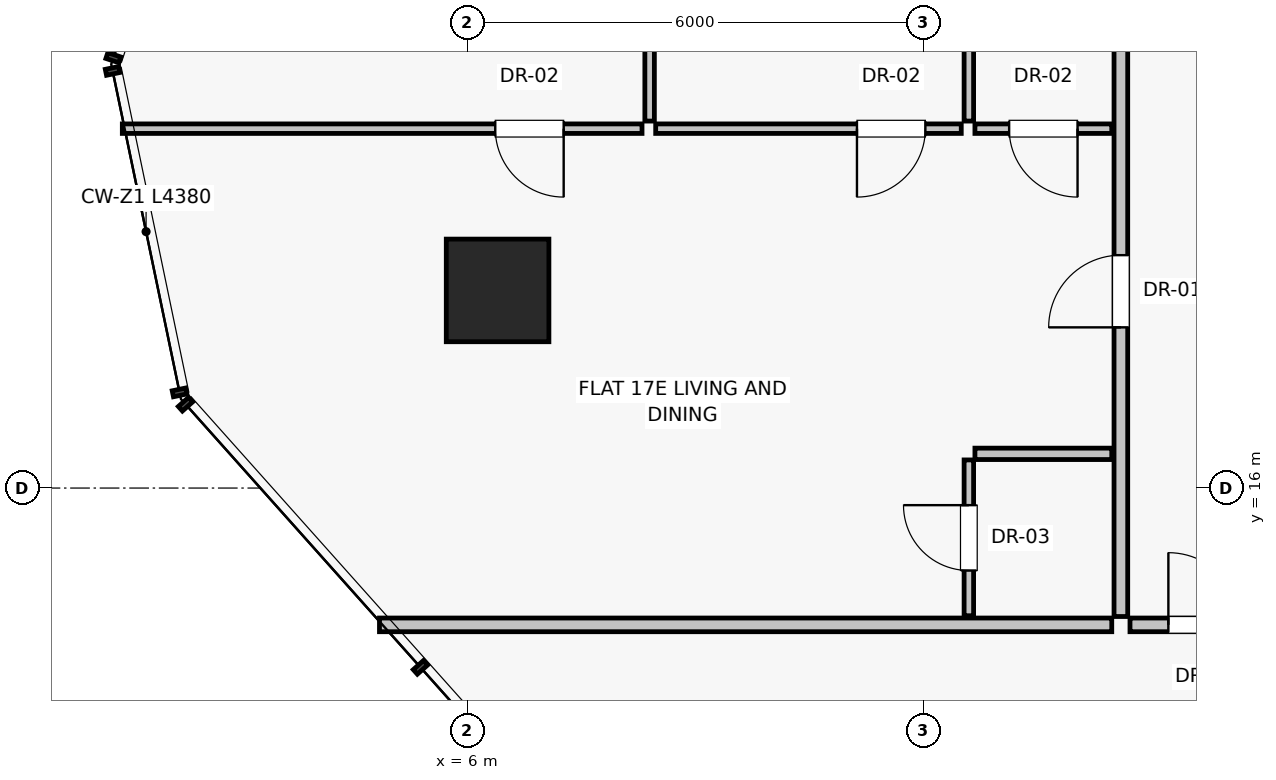
"""IFC4 building model, lengths in metres.
Left out: names, types, materials, properties, quantities, classifications, styles, units other than length and angle.
Written with IfcOpenShell. Run it as: python <this file> out.ifc"""

import sys

from ifc_helpers import new_model, si_unit, direction, frame, frame_2d, origin, origin_2d, place, context, subcontext, project, spatial, rectangle, extrude, source, transform, mapped, element, fill, save


model = new_model("IFC4")
c1 = context("Model", 3, precision=1e-05, world=origin(), true_north=direction((0.0, 1.0)))
c2 = subcontext(c1, "Body", "Model", "MODEL_VIEW")
j1 = project(units=[si_unit("LENGTHUNIT", "METRE"), si_unit("PLANEANGLEUNIT", "RADIAN")], contexts=[c1])
p1 = place(None, origin())
s1 = spatial("IfcSite", under=j1, at=p1, CompositionType="ELEMENT")
p2 = place(p1, origin())
s2 = spatial("IfcBuilding", under=s1, at=p2, CompositionType="ELEMENT")
p3 = place(p2, frame((0.0, 0.0, 64.1)))
s3 = spatial("IfcBuildingStorey", under=s2, at=p3, CompositionType="ELEMENT", Elevation=64.1)
p4 = place(p3, frame((6.4, 18.6, 0.0), z_axis=(0.0, 0.0, 1.0), x_axis=(1.0, 0.0, 0.0)))
e1 = element("IfcColumn", 1, at=p4, inside=s3, PredefinedType="COLUMN", context=c2, shape_type="SweptSolid", body=[
    extrude(rectangle(XDim=1.35, YDim=1.35, at=origin_2d()), origin(), (0.0, 0.0, 1.0), 3.25),
])
p5 = place(p3, frame((14.48, 14.2, 0.0), z_axis=(0.0, 0.0, 1.0), x_axis=(-1.0, 0.0, 0.0)))
e2 = element("IfcWall", 2, at=p5, inside=s3, PredefinedType="PARTITIONING", context=c2, shape_type="SweptSolid", body=[
    extrude(rectangle(XDim=9.634, YDim=0.18, at=frame_2d((4.817, 0.0))), origin(), (0.0, 0.0, 1.0), 3.0),
])
p6 = place(p3, frame((14.6, 14.31, 0.0), z_axis=(0.0, 0.0, 1.0), x_axis=(0.0, 1.0, 0.0)))
e3 = element("IfcWall", 3, at=p6, inside=s3, PredefinedType="PARTITIONING", context=c2, shape_type="SweptSolid", body=[
    extrude(rectangle(XDim=11.438, YDim=0.18, at=frame_2d((5.719, 0.0))), origin(), (0.0, 0.0, 1.0), 3.0),
])
p7 = place(p6, frame((3.804, 0.0, 0.0)))
e4 = element("IfcOpeningElement", 4, at=p7, cuts=e3, PredefinedType="OPENING", context=c2, shape_type="SweptSolid", body=[
    extrude(rectangle(XDim=0.95, YDim=2.02, at=frame_2d((0.475, 1.01))), frame((0.0, 0.1, 0.0), z_axis=(0.0, -1.0, 0.0), x_axis=(1.0, 0.0, 0.0)), (0.0, 0.0, 1.0), 0.2),
])
p8 = place(p3, frame((14.48, 16.45, 0.0), z_axis=(0.0, 0.0, 1.0), x_axis=(-1.0, 0.0, 0.0)))
e5 = element("IfcWall", 5, at=p8, inside=s3, PredefinedType="PARTITIONING", context=c2, shape_type="SweptSolid", body=[
    extrude(rectangle(XDim=1.8, YDim=0.15, at=frame_2d((0.9, 0.0))), origin(), (0.0, 0.0, 1.0), 3.0),
])
p9 = place(p3, frame((12.6, 14.32, 0.0), z_axis=(0.0, 0.0, 1.0), x_axis=(0.0, 1.0, 0.0)))
e6 = element("IfcWall", 6, at=p9, inside=s3, PredefinedType="PARTITIONING", context=c2, shape_type="SweptSolid", body=[
    extrude(rectangle(XDim=2.05, YDim=0.125, at=frame_2d((1.025, 0.0))), origin(), (0.0, 0.0, 1.0), 3.0),
])
p10 = place(p9, frame((0.595, 0.0, 0.0)))
e7 = element("IfcOpeningElement", 7, at=p10, cuts=e6, PredefinedType="OPENING", context=c2, shape_type="SweptSolid", body=[
    extrude(rectangle(XDim=0.86, YDim=2.01, at=frame_2d((0.43, 1.005))), frame((0.0, 0.073, 0.0), z_axis=(0.0, -1.0, 0.0), x_axis=(1.0, 0.0, 0.0)), (0.0, 0.0, 1.0), 0.145),
])
p11 = place(p3, frame((14.48, 20.728, 0.0), z_axis=(0.0, 0.0, 1.0), x_axis=(-1.0, 0.0, 0.0)))
e8 = element("IfcWall", 8, at=p11, inside=s3, PredefinedType="PARTITIONING", context=c2, shape_type="SweptSolid", body=[
    extrude(rectangle(XDim=1.8, YDim=0.125, at=frame_2d((0.9, 0.0))), origin(), (0.0, 0.0, 1.0), 3.0),
])
p12 = place(p11, frame((0.45, 0.0, 0.0)))
e9 = element("IfcOpeningElement", 9, at=p12, cuts=e8, PredefinedType="OPENING", context=c2, shape_type="SweptSolid", body=[
    extrude(rectangle(XDim=0.9, YDim=2.01, at=frame_2d((0.45, 1.005))), frame((0.0, 0.073, 0.0), z_axis=(0.0, -1.0, 0.0), x_axis=(1.0, 0.0, 0.0)), (0.0, 0.0, 1.0), 0.145),
])
for number, where, z_axis, x_axis in (
    (10, (12.6, 20.828, 0.0), (0.0, 0.0, 1.0), (0.0, 1.0, 0.0)),
    (11, (8.4, 20.828, 0.0), (0.0, 0.0, 1.0), (0.0, 1.0, 0.0)),
):
    element("IfcWall", number, at=place(p3, frame(where, z_axis=z_axis, x_axis=x_axis)), inside=s3, PredefinedType="PARTITIONING", context=c2, shape_type="SweptSolid", body=[
        extrude(rectangle(XDim=4.91, YDim=0.125, at=frame_2d((2.455, 0.0))), origin(), (0.0, 0.0, 1.0), 3.0),
    ])
p13 = place(p3, frame((12.5, 20.728, 0.0), z_axis=(0.0, 0.0, 1.0), x_axis=(-1.0, 0.0, 0.0)))
e12 = element("IfcWall", 12, at=p13, inside=s3, PredefinedType="PARTITIONING", context=c2, shape_type="SweptSolid", body=[
    extrude(rectangle(XDim=4.02, YDim=0.125, at=frame_2d((2.01, 0.0))), origin(), (0.0, 0.0, 1.0), 3.0),
])
p14 = place(p13, frame((0.472, 0.0, 0.0)))
e13 = element("IfcOpeningElement", 13, at=p14, cuts=e12, PredefinedType="OPENING", context=c2, shape_type="SweptSolid", body=[
    extrude(rectangle(XDim=0.9, YDim=2.01, at=frame_2d((0.45, 1.005))), frame((0.0, 0.073, 0.0), z_axis=(0.0, -1.0, 0.0), x_axis=(1.0, 0.0, 0.0)), (0.0, 0.0, 1.0), 0.145),
])
p15 = place(p3, frame((8.3, 20.728, 0.0), z_axis=(0.0, 0.0, 1.0), x_axis=(-1.0, 0.0, 0.0)))
e14 = element("IfcWall", 14, at=p15, inside=s3, PredefinedType="PARTITIONING", context=c2, shape_type="SweptSolid", body=[
    extrude(rectangle(XDim=6.837, YDim=0.125, at=frame_2d((3.418, 0.0))), origin(), (0.0, 0.0, 1.0), 3.0),
])
p16 = place(p15, frame((1.031, 0.0, 0.0)))
e15 = element("IfcOpeningElement", 15, at=p16, cuts=e14, PredefinedType="OPENING", context=c2, shape_type="SweptSolid", body=[
    extrude(rectangle(XDim=0.9, YDim=2.01, at=frame_2d((0.45, 1.005))), frame((0.0, 0.073, 0.0), z_axis=(0.0, -1.0, 0.0), x_axis=(1.0, 0.0, 0.0)), (0.0, 0.0, 1.0), 0.145),
])
p17 = place(p3, frame((14.72, 14.2, 0.0), z_axis=(0.0, 0.0, 1.0), x_axis=(1.0, 0.0, 0.0)))
e16 = element("IfcWall", 16, at=p17, inside=s3, PredefinedType="PARTITIONING", context=c2, shape_type="SweptSolid", body=[
    extrude(rectangle(XDim=1.96, YDim=0.18, at=frame_2d((0.98, 0.0))), origin(), (0.0, 0.0, 1.0), 3.0),
])
p18 = place(p17, frame((0.505, 0.0, 0.0)))
e17 = element("IfcOpeningElement", 17, at=p18, cuts=e16, PredefinedType="OPENING", context=c2, shape_type="SweptSolid", body=[
    extrude(rectangle(XDim=0.95, YDim=2.02, at=frame_2d((0.475, 1.01))), frame((0.0, 0.1, 0.0), z_axis=(0.0, -1.0, 0.0), x_axis=(1.0, 0.0, 0.0)), (0.0, 0.0, 1.0), 0.2),
])
m1 = source(origin(), c2, "Body", "SweptSolid", [
    extrude(rectangle(XDim=0.95, YDim=2.02, at=frame_2d((0.475, 1.01))), frame((0.0, 0.025, 0.0), z_axis=(0.0, -1.0, 0.0), x_axis=(1.0, 0.0, 0.0)), (0.0, 0.0, 1.0), 0.05),
])
p19 = place(p7, origin())
e18 = element("IfcDoor", 18, at=p19, inside=s3, OperationType="SINGLE_SWING_LEFT", PredefinedType="DOOR", context=c2, shape_type="MappedRepresentation", body=[
    mapped(m1, transform((0.0, 0.0, 0.0), scale=1.0)),
])
fill(e4, e18)
m2 = source(origin(), c2, "Body", "SweptSolid", [
    extrude(rectangle(XDim=0.86, YDim=2.01, at=frame_2d((0.43, 1.005))), frame((0.0, 0.025, 0.0), z_axis=(0.0, -1.0, 0.0), x_axis=(1.0, 0.0, 0.0)), (0.0, 0.0, 1.0), 0.05),
])
p20 = place(p10, origin())
e19 = element("IfcDoor", 19, at=p20, inside=s3, OperationType="SINGLE_SWING_RIGHT", PredefinedType="DOOR", context=c2, shape_type="MappedRepresentation", body=[
    mapped(m2, transform((0.0, 0.0, 0.0), scale=1.0)),
])
fill(e7, e19)
m3 = source(origin(), c2, "Body", "SweptSolid", [
    extrude(rectangle(XDim=0.9, YDim=2.01, at=frame_2d((0.45, 1.005))), frame((0.0, 0.025, 0.0), z_axis=(0.0, -1.0, 0.0), x_axis=(1.0, 0.0, 0.0)), (0.0, 0.0, 1.0), 0.05),
])
p21 = place(p12, origin())
e20 = element("IfcDoor", 20, at=p21, inside=s3, OperationType="SINGLE_SWING_LEFT", PredefinedType="DOOR", context=c2, shape_type="MappedRepresentation", body=[
    mapped(m3, transform((0.0, 0.0, 0.0), scale=1.0)),
])
fill(e9, e20)
p22 = place(p14, origin())
e21 = element("IfcDoor", 21, at=p22, inside=s3, OperationType="SINGLE_SWING_RIGHT", PredefinedType="DOOR", context=c2, shape_type="MappedRepresentation", body=[
    mapped(m3, transform((0.0, 0.0, 0.0), scale=1.0)),
])
fill(e13, e21)
p23 = place(p16, origin())
e22 = element("IfcDoor", 22, at=p23, inside=s3, OperationType="SINGLE_SWING_LEFT", PredefinedType="DOOR", context=c2, shape_type="MappedRepresentation", body=[
    mapped(m3, transform((0.0, 0.0, 0.0), scale=1.0)),
])
fill(e15, e22)
p24 = place(p18, origin())
e23 = element("IfcDoor", 23, at=p24, inside=s3, OperationType="SINGLE_SWING_LEFT", PredefinedType="DOOR", context=c2, shape_type="MappedRepresentation", body=[
    mapped(m1, transform((0.0, 0.0, 0.0), scale=1.0)),
])
fill(e17, e23)
save(model, sys.argv[1])
